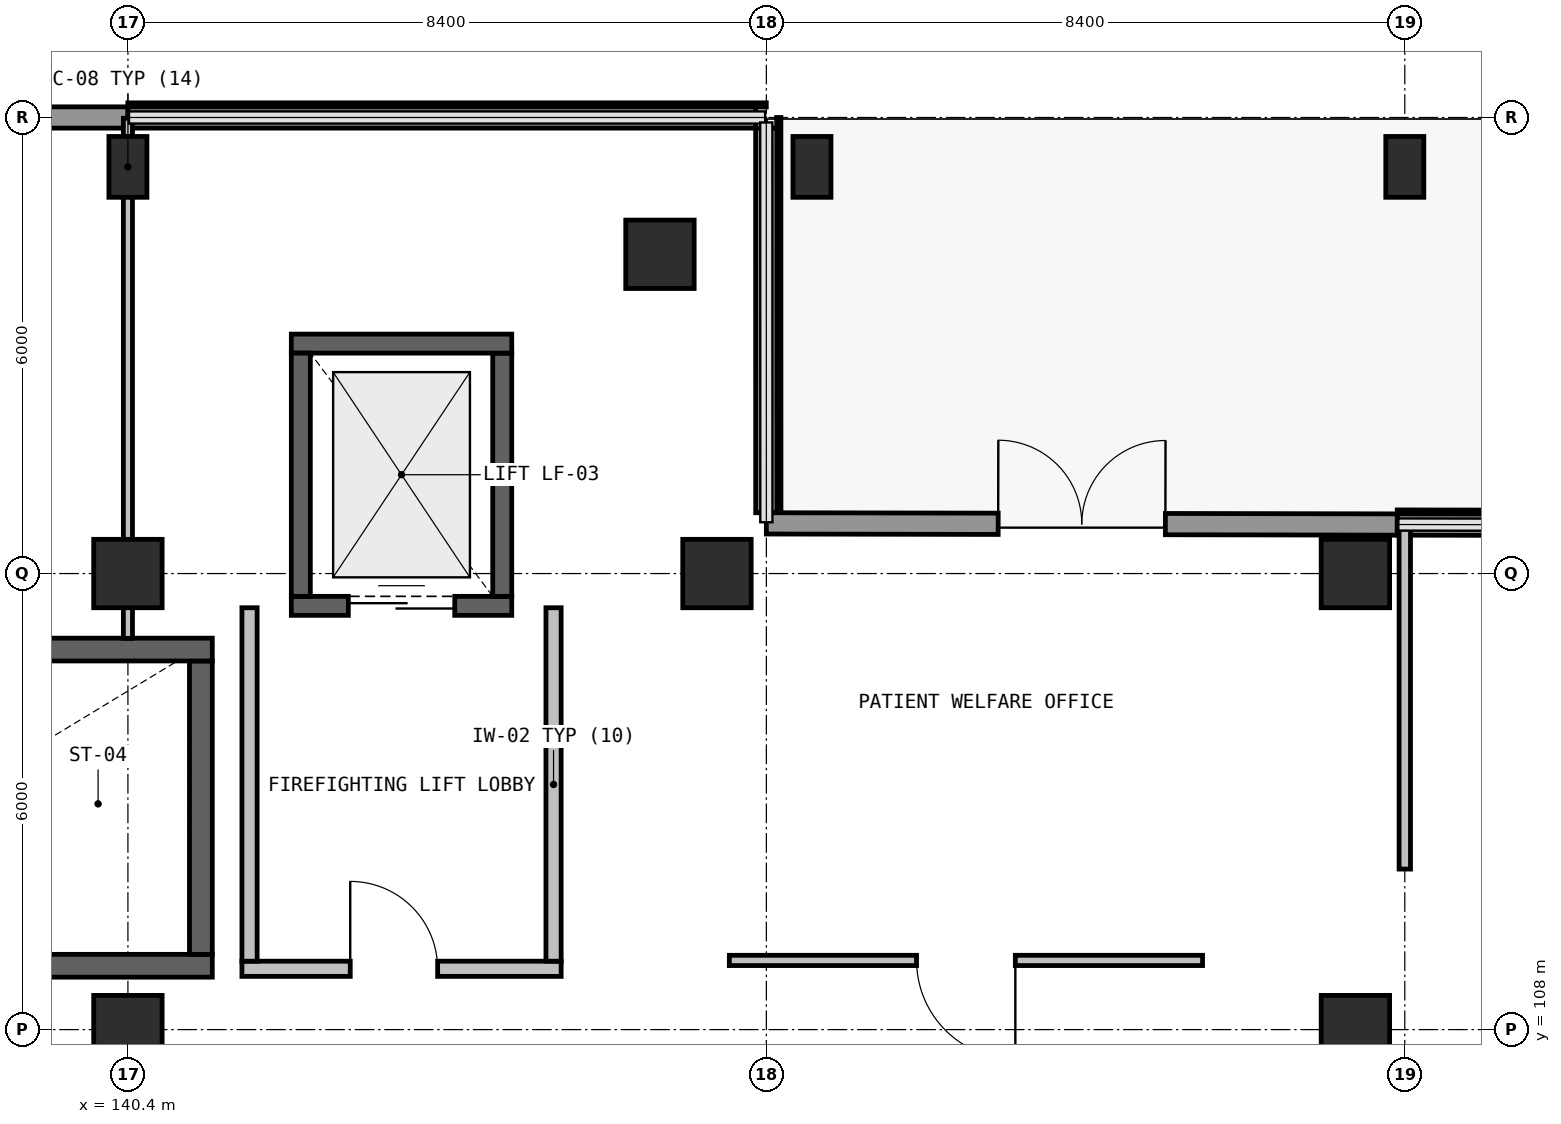
"""IFC4 building model, lengths in metres.
Left out: names, types, materials, properties, quantities, classifications, styles, units other than length and angle.
Written with IfcOpenShell. Run it as: python <this file> out.ifc"""

import sys

from ifc_helpers import new_model, si_unit, direction, frame, frame_2d, origin, origin_2d, place, context, subcontext, project, spatial, rectangle, extrude, element, fill, save


model = new_model("IFC4")
c1 = context("Model", 3, precision=1e-05, world=origin(), true_north=direction((0.0, 1.0)))
c2 = subcontext(c1, "Body", "Model", "MODEL_VIEW")
j1 = project(units=[si_unit("LENGTHUNIT", "METRE"), si_unit("PLANEANGLEUNIT", "RADIAN")], contexts=[c1])
p1 = place(None, origin())
s1 = spatial("IfcSite", under=j1, at=p1, CompositionType="ELEMENT")
p2 = place(p1, origin())
s2 = spatial("IfcBuilding", under=s1, at=p2, CompositionType="ELEMENT")
p3 = place(p2, origin())
s3 = spatial("IfcBuildingStorey", under=s2, at=p3, CompositionType="ELEMENT", Elevation=0.0)
p4 = place(p3, frame((147.4, 118.2, 0.0), z_axis=(0.0, 0.0, 1.0), x_axis=(1.0, 0.0, 0.0)))
e1 = element("IfcColumn", 1, at=p4, inside=s3, PredefinedType="COLUMN", context=c2, shape_type="SweptSolid", body=[
    extrude(rectangle(XDim=0.9, YDim=0.9, at=origin_2d()), origin(), (0.0, 0.0, 1.0), 5.4),
])
for number, where, z_axis, x_axis in (
    (2, (149.4, 119.35, 0.0), (0.0, 0.0, 1.0), (1.0, 0.0, 0.0)),
    (3, (157.2, 119.35, 0.0), (0.0, 0.0, 1.0), (1.0, 0.0, 0.0)),
):
    element("IfcColumn", number, at=place(p3, frame(where, z_axis=z_axis, x_axis=x_axis)), inside=s3, PredefinedType="COLUMN", context=c2, shape_type="SweptSolid", body=[
        extrude(rectangle(XDim=0.5, YDim=0.8, at=origin_2d()), origin(), (0.0, 0.0, 1.0), 5.4),
    ])
for number, where, z_axis, x_axis in (
    (4, (140.4, 108.0, 0.0), (0.0, 0.0, 1.0), (1.0, 0.0, 0.0)),
    (5, (140.4, 114.0, 0.0), (0.0, 0.0, 1.0), (1.0, 0.0, 0.0)),
):
    element("IfcColumn", number, at=place(p3, frame(where, z_axis=z_axis, x_axis=x_axis)), inside=s3, PredefinedType="COLUMN", context=c2, shape_type="SweptSolid", body=[
        extrude(rectangle(XDim=0.9, YDim=0.9, at=origin_2d()), origin(), (0.0, 0.0, 1.0), 5.4),
    ])
p5 = place(p3, frame((140.4, 119.35, 0.0), z_axis=(0.0, 0.0, 1.0), x_axis=(1.0, 0.0, 0.0)))
e6 = element("IfcColumn", 6, at=p5, inside=s3, PredefinedType="COLUMN", context=c2, shape_type="SweptSolid", body=[
    extrude(rectangle(XDim=0.5, YDim=0.8, at=origin_2d()), origin(), (0.0, 0.0, 1.0), 5.4),
])
for number, where, z_axis, x_axis in (
    (7, (148.15, 114.0, 0.0), (0.0, 0.0, 1.0), (1.0, 0.0, 0.0)),
    (8, (156.55, 108.0, 0.0), (0.0, 0.0, 1.0), (1.0, 0.0, 0.0)),
    (9, (156.55, 114.0, 0.0), (0.0, 0.0, 1.0), (1.0, 0.0, 0.0)),
):
    element("IfcColumn", number, at=place(p3, frame(where, z_axis=z_axis, x_axis=x_axis)), inside=s3, PredefinedType="COLUMN", context=c2, shape_type="SweptSolid", body=[
        extrude(rectangle(XDim=0.9, YDim=0.9, at=origin_2d()), origin(), (0.0, 0.0, 1.0), 5.4),
    ])
p6 = place(p3, frame((131.999, 120.0, 0.0), z_axis=(0.0, 0.0, 1.0), x_axis=(1.0, 0.0, 0.0)))
e10 = element("IfcWall", 10, at=p6, inside=s3, PredefinedType="SOLIDWALL", context=c2, shape_type="SweptSolid", body=[
    extrude(rectangle(XDim=8.4, YDim=0.28, at=frame_2d((4.2, 0.0))), origin(), (0.0, 0.0, 1.0), 5.08),
])
p7 = place(p6, frame((3.0, 0.0, 0.0)))
e11 = element("IfcOpeningElement", 11, at=p7, cuts=e10, PredefinedType="OPENING", context=c2, shape_type="SweptSolid", body=[
    extrude(rectangle(XDim=2.4, YDim=2.35, at=frame_2d((1.2, 1.175))), frame((0.0, 0.15, 0.0), z_axis=(0.0, -1.0, 0.0), x_axis=(1.0, 0.0, 0.0)), (0.0, 0.0, 1.0), 0.3),
])
p8 = place(p3, frame((140.401, 120.0, 0.0), z_axis=(0.0, 0.0, 1.0), x_axis=(1.0, 0.0, 0.0)))
e12 = element("IfcWall", 12, at=p8, inside=s3, PredefinedType="SOLIDWALL", context=c2, shape_type="SweptSolid", body=[
    extrude(rectangle(XDim=8.258, YDim=0.28, at=frame_2d((4.129, 0.0))), origin(), (0.0, 0.0, 1.0), 0.94),
])
p9 = place(p3, frame((148.799, 119.86, 0.0), z_axis=(0.0, 0.0, 1.0), x_axis=(0.000192994303, -0.999999981377, 0.0)))
e13 = element("IfcWall", 13, at=p9, inside=s3, PredefinedType="SOLIDWALL", context=c2, shape_type="SweptSolid", body=[
    extrude(rectangle(XDim=5.06, YDim=0.28, at=frame_2d((2.53, 0.0))), origin(), (0.0, 0.0, 1.0), 0.94),
])
p10 = place(p3, frame((148.8, 114.66, 0.0), z_axis=(0.0, 0.0, 1.0), x_axis=(0.999998390291, -0.001794273077, 0.0)))
e14 = element("IfcWall", 14, at=p10, inside=s3, PredefinedType="SOLIDWALL", context=c2, shape_type="SweptSolid", body=[
    extrude(rectangle(XDim=8.3, YDim=0.28, at=frame_2d((4.15, 0.0))), origin(), (0.0, 0.0, 1.0), 5.08),
])
p11 = place(p10, frame((3.05, 0.0, 0.0)))
e15 = element("IfcOpeningElement", 15, at=p11, cuts=e14, PredefinedType="OPENING", context=c2, shape_type="SweptSolid", body=[
    extrude(rectangle(XDim=2.2, YDim=2.35, at=frame_2d((1.1, 1.175))), frame((0.0, 0.15, 0.0), z_axis=(0.0, -1.0, 0.0), x_axis=(1.0, 0.0, 0.0)), (0.0, 0.0, 1.0), 0.3),
])
p12 = place(p3, frame((157.102, 114.645, 0.0), z_axis=(0.0, 0.0, 1.0), x_axis=(0.999998335025, -0.00182481448, 0.0)))
e16 = element("IfcWall", 16, at=p12, inside=s3, PredefinedType="SOLIDWALL", context=c2, shape_type="SweptSolid", body=[
    extrude(rectangle(XDim=8.295, YDim=0.28, at=frame_2d((4.147, 0.0))), origin(), (0.0, 0.0, 1.0), 0.94),
])
p13 = place(p3, frame((132.49, 108.84, 0.0), z_axis=(0.0, 0.0, 1.0), x_axis=(1.0, 0.0, 0.0)))
e17 = element("IfcWall", 17, at=p13, inside=s3, PredefinedType="SHEAR", context=c2, shape_type="SweptSolid", body=[
    extrude(rectangle(XDim=9.02, YDim=0.3, at=frame_2d((4.51, 0.0))), origin(), (0.0, 0.0, 1.0), 5.08),
])
p14 = place(p3, frame((141.36, 108.99, 0.0), z_axis=(0.0, 0.0, 1.0), x_axis=(0.0, 1.0, 0.0)))
e18 = element("IfcWall", 18, at=p14, inside=s3, PredefinedType="SHEAR", context=c2, shape_type="SweptSolid", body=[
    extrude(rectangle(XDim=3.86, YDim=0.3, at=frame_2d((1.93, 0.0))), origin(), (0.0, 0.0, 1.0), 5.08),
])
p15 = place(p3, frame((141.51, 113.0, 0.0), z_axis=(0.0, 0.0, 1.0), x_axis=(-1.0, 0.0, 0.0)))
e19 = element("IfcWall", 19, at=p15, inside=s3, PredefinedType="SHEAR", context=c2, shape_type="SweptSolid", body=[
    extrude(rectangle(XDim=9.02, YDim=0.3, at=frame_2d((4.51, 0.0))), origin(), (0.0, 0.0, 1.0), 5.08),
])
p16 = place(p3, frame((141.9, 108.8, 0.0), z_axis=(0.0, 0.0, 1.0), x_axis=(1.0, 0.0, 0.0)))
e20 = element("IfcWall", 20, at=p16, inside=s3, PredefinedType="SOLIDWALL", context=c2, shape_type="SweptSolid", body=[
    extrude(rectangle(XDim=4.2, YDim=0.2, at=frame_2d((2.1, 0.0))), origin(), (0.0, 0.0, 1.0), 5.08),
])
p17 = place(p16, frame((1.425, 0.0, 0.0)))
e21 = element("IfcOpeningElement", 21, at=p17, cuts=e20, PredefinedType="OPENING", context=c2, shape_type="SweptSolid", body=[
    extrude(rectangle(XDim=1.15, YDim=2.15, at=frame_2d((0.575, 1.075))), frame((0.0, 0.11, 0.0), z_axis=(0.0, -1.0, 0.0), x_axis=(1.0, 0.0, 0.0)), (0.0, 0.0, 1.0), 0.22),
])
for number, where, z_axis, x_axis in (
    (22, (146.0, 108.9, 0.0), (0.0, 0.0, 1.0), (0.0, 1.0, 0.0)),
    (23, (142.0, 113.55, 0.0), (0.0, 0.0, 1.0), (0.0, -1.0, 0.0)),
):
    element("IfcWall", number, at=place(p3, frame(where, z_axis=z_axis, x_axis=x_axis)), inside=s3, PredefinedType="SOLIDWALL", context=c2, shape_type="SweptSolid", body=[
        extrude(rectangle(XDim=4.65, YDim=0.2, at=frame_2d((2.325, 0.0))), origin(), (0.0, 0.0, 1.0), 5.08),
    ])
p18 = place(p3, frame((142.55, 113.575, 0.0), z_axis=(0.0, 0.0, 1.0), x_axis=(1.0, 0.0, 0.0)))
e24 = element("IfcWall", 24, at=p18, inside=s3, PredefinedType="SHEAR", context=c2, shape_type="SweptSolid", body=[
    extrude(rectangle(XDim=2.9, YDim=0.25, at=frame_2d((1.45, 0.0))), origin(), (0.0, 0.0, 1.0), 5.08),
])
p19 = place(p18, frame((0.75, 0.0, 0.0)))
e25 = element("IfcOpeningElement", 25, at=p19, cuts=e24, PredefinedType="OPENING", context=c2, shape_type="SweptSolid", body=[
    extrude(rectangle(XDim=1.4, YDim=2.15, at=frame_2d((0.7, 1.075))), frame((0.0, 0.135, 0.0), z_axis=(0.0, -1.0, 0.0), x_axis=(1.0, 0.0, 0.0)), (0.0, 0.0, 1.0), 0.27),
])
p20 = place(p3, frame((145.325, 113.7, 0.0), z_axis=(0.0, 0.0, 1.0), x_axis=(0.0, 1.0, 0.0)))
e26 = element("IfcWall", 26, at=p20, inside=s3, PredefinedType="SHEAR", context=c2, shape_type="SweptSolid", body=[
    extrude(rectangle(XDim=3.2, YDim=0.25, at=frame_2d((1.6, 0.0))), origin(), (0.0, 0.0, 1.0), 5.08),
])
p21 = place(p3, frame((145.45, 117.025, 0.0), z_axis=(0.0, 0.0, 1.0), x_axis=(-1.0, 0.0, 0.0)))
e27 = element("IfcWall", 27, at=p21, inside=s3, PredefinedType="SHEAR", context=c2, shape_type="SweptSolid", body=[
    extrude(rectangle(XDim=2.9, YDim=0.25, at=frame_2d((1.45, 0.0))), origin(), (0.0, 0.0, 1.0), 5.08),
])
p22 = place(p3, frame((142.675, 116.9, 0.0), z_axis=(0.0, 0.0, 1.0), x_axis=(0.0, -1.0, 0.0)))
e28 = element("IfcWall", 28, at=p22, inside=s3, PredefinedType="SHEAR", context=c2, shape_type="SweptSolid", body=[
    extrude(rectangle(XDim=3.2, YDim=0.25, at=frame_2d((1.6, 0.0))), origin(), (0.0, 0.0, 1.0), 5.08),
])
p23 = place(p3, frame((157.2, 114.59, 0.0), z_axis=(0.0, 0.0, 1.0), x_axis=(0.0, -1.0, 0.0)))
e29 = element("IfcWall", 29, at=p23, inside=s3, PredefinedType="PARTITIONING", context=c2, shape_type="SweptSolid", body=[
    extrude(rectangle(XDim=4.478, YDim=0.15, at=frame_2d((2.239, 0.0))), origin(), (0.0, 0.0, 1.0), 5.08),
])
p24 = place(p3, frame((154.539, 108.91, 0.0), z_axis=(0.0, 0.0, 1.0), x_axis=(-1.0, 0.0, 0.0)))
e30 = element("IfcWall", 30, at=p24, inside=s3, PredefinedType="PARTITIONING", context=c2, shape_type="SweptSolid", body=[
    extrude(rectangle(XDim=6.226, YDim=0.135, at=frame_2d((3.113, 0.0))), origin(), (0.0, 0.0, 1.0), 5.08),
])
p25 = place(p24, frame((2.463, 0.0, 0.0)))
e31 = element("IfcOpeningElement", 31, at=p25, cuts=e30, PredefinedType="OPENING", context=c2, shape_type="SweptSolid", body=[
    extrude(rectangle(XDim=1.3, YDim=2.15, at=frame_2d((0.65, 1.075))), frame((0.0, 0.077, 0.0), z_axis=(0.0, -1.0, 0.0), x_axis=(1.0, 0.0, 0.0)), (0.0, 0.0, 1.0), 0.155),
])
p26 = place(p3, frame((140.4, 113.147, 0.0), z_axis=(0.0, 0.0, 1.0), x_axis=(0.0, 1.0, 0.0)))
e32 = element("IfcWall", 32, at=p26, inside=s3, PredefinedType="PARTITIONING", context=c2, shape_type="SweptSolid", body=[
    extrude(rectangle(XDim=6.843, YDim=0.12, at=frame_2d((3.421, 0.0))), origin(), (0.0, 0.0, 1.0), 4.33),
])
p27 = place(p11, origin())
e33 = element("IfcDoor", 33, at=p27, inside=s3, OperationType="DOUBLE_DOOR_SINGLE_SWING", PredefinedType="DOOR", context=c2, shape_type="SweptSolid", body=[
    extrude(rectangle(XDim=2.2, YDim=2.35, at=frame_2d((1.1, 1.175))), frame((0.0, 0.025, 0.0), z_axis=(0.0, -1.0, 0.0), x_axis=(1.0, 0.0, 0.0)), (0.0, 0.0, 1.0), 0.05),
])
fill(e15, e33)
p28 = place(p17, origin())
e34 = element("IfcDoor", 34, at=p28, inside=s3, OperationType="SINGLE_SWING_RIGHT", PredefinedType="DOOR", context=c2, shape_type="SweptSolid", body=[
    extrude(rectangle(XDim=1.15, YDim=2.15, at=frame_2d((0.575, 1.075))), frame((0.0, 0.025, 0.0), z_axis=(0.0, -1.0, 0.0), x_axis=(1.0, 0.0, 0.0)), (0.0, 0.0, 1.0), 0.05),
])
fill(e21, e34)
p29 = place(p19, origin())
e35 = element("IfcDoor", 35, at=p29, inside=s3, OperationType="DOUBLE_DOOR_SLIDING", PredefinedType="DOOR", context=c2, shape_type="SweptSolid", body=[
    extrude(rectangle(XDim=1.4, YDim=2.15, at=frame_2d((0.7, 1.075))), frame((0.0, 0.025, 0.0), z_axis=(0.0, -1.0, 0.0), x_axis=(1.0, 0.0, 0.0)), (0.0, 0.0, 1.0), 0.05),
])
fill(e25, e35)
p30 = place(p25, origin())
e36 = element("IfcDoor", 36, at=p30, inside=s3, OperationType="SINGLE_SWING_RIGHT", PredefinedType="DOOR", context=c2, shape_type="SweptSolid", body=[
    extrude(rectangle(XDim=1.3, YDim=2.15, at=frame_2d((0.65, 1.075))), frame((0.0, 0.025, 0.0), z_axis=(0.0, -1.0, 0.0), x_axis=(1.0, 0.0, 0.0)), (0.0, 0.0, 1.0), 0.05),
])
fill(e31, e36)
save(model, sys.argv[1])
